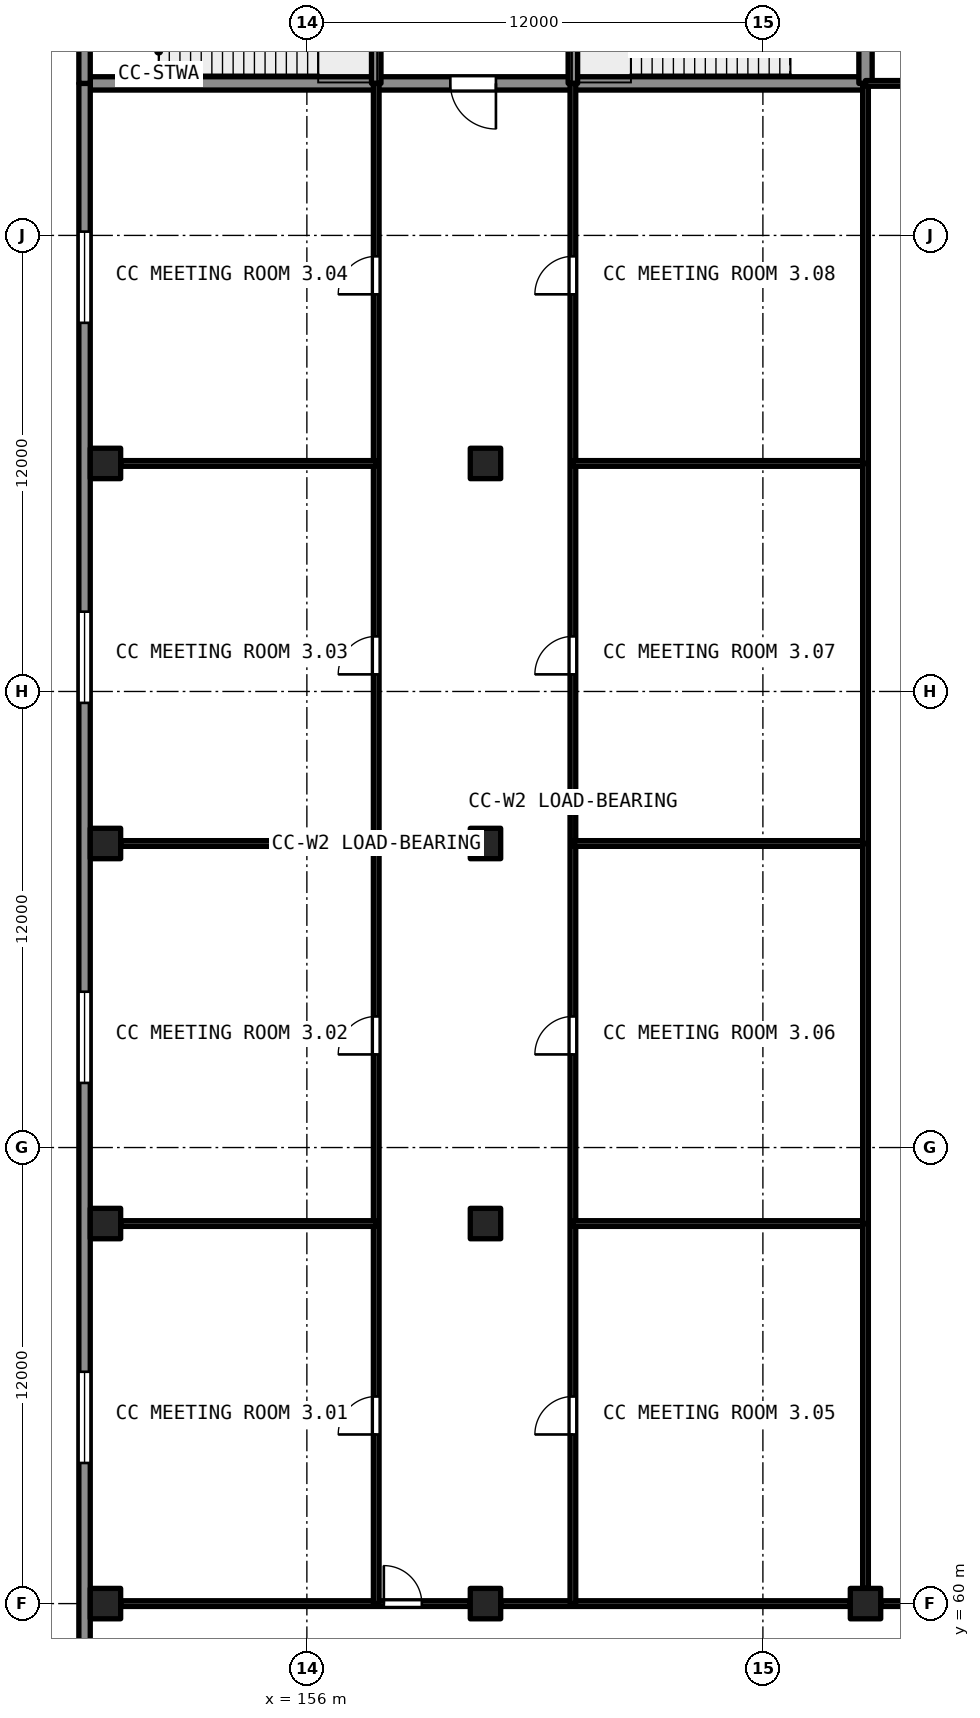
"""IFC4 building model, lengths in metres.
Left out: names, types, materials, properties, quantities, classifications, styles, units other than length and angle.
Written with IfcOpenShell. Run it as: python <this file> out.ifc"""

import sys

from ifc_helpers import new_model, si_unit, direction, frame, frame_2d, origin, origin_2d, place, context, subcontext, project, spatial, rectangle, extrude, element, fill, save


model = new_model("IFC4")
c1 = context("Model", 3, precision=1e-05, world=origin(), true_north=direction((0.0, 1.0)))
c2 = subcontext(c1, "Body", "Model", "MODEL_VIEW")
j1 = project(units=[si_unit("LENGTHUNIT", "METRE"), si_unit("PLANEANGLEUNIT", "RADIAN")], contexts=[c1])
p1 = place(None, origin())
s1 = spatial("IfcSite", under=j1, at=p1, CompositionType="ELEMENT")
p2 = place(p1, origin())
s2 = spatial("IfcBuilding", under=s1, at=p2, CompositionType="ELEMENT")
p3 = place(p2, frame((0.0, 0.0, 20.4)))
s3 = spatial("IfcBuildingStorey", under=s2, at=p3, CompositionType="ELEMENT", Elevation=20.4)
for number, where, z_axis, x_axis in (
    (1, (150.7, 60.0, 0.0), (0.0, 0.0, 1.0), (1.0, 0.0, 0.0)),
    (2, (150.7, 70.0, 0.0), (0.0, 0.0, 1.0), (1.0, 0.0, 0.0)),
    (3, (150.7, 80.0, 0.0), (0.0, 0.0, 1.0), (1.0, 0.0, 0.0)),
    (4, (150.7, 90.0, 0.0), (0.0, 0.0, 1.0), (1.0, 0.0, 0.0)),
    (5, (160.7, 60.0, 0.0), (0.0, 0.0, 1.0), (1.0, 0.0, 0.0)),
    (6, (160.7, 70.0, 0.0), (0.0, 0.0, 1.0), (1.0, 0.0, 0.0)),
    (7, (160.7, 80.0, 0.0), (0.0, 0.0, 1.0), (1.0, 0.0, 0.0)),
    (8, (160.7, 90.0, 0.0), (0.0, 0.0, 1.0), (1.0, 0.0, 0.0)),
    (9, (170.7, 60.0, 0.0), (0.0, 0.0, 1.0), (1.0, 0.0, 0.0)),
):
    element("IfcColumn", number, at=place(p3, frame(where, z_axis=z_axis, x_axis=x_axis)), inside=s3, PredefinedType="COLUMN", context=c2, shape_type="SweptSolid", body=[
        extrude(rectangle(XDim=0.8, YDim=0.8, at=origin_2d()), origin(), (0.0, 0.0, 1.0), 4.59),
    ])
p4 = place(p3, frame((150.3, 100.0, 0.0), z_axis=(0.0, 0.0, 1.0), x_axis=(1.0, 0.0, 0.0)))
e10 = element("IfcWall", 10, at=p4, inside=s3, PredefinedType="SHEAR", context=c2, shape_type="SweptSolid", body=[
    extrude(rectangle(XDim=7.525, YDim=0.35, at=frame_2d((3.762, 0.0))), origin(), (0.0, 0.0, 1.0), 4.59),
])
p5 = place(p3, frame((163.0, 100.0, 0.0), z_axis=(0.0, 0.0, 1.0), x_axis=(-1.0, 0.0, 0.0)))
e11 = element("IfcWall", 11, at=p5, inside=s3, PredefinedType="SHEAR", context=c2, shape_type="SweptSolid", body=[
    extrude(rectangle(XDim=5.175, YDim=0.35, at=frame_2d((2.587, 0.0))), origin(), (0.0, 0.0, 1.0), 4.59),
])
p6 = place(p5, frame((2.025, 0.0, 0.0)))
e12 = element("IfcOpeningElement", 12, at=p6, cuts=e11, PredefinedType="OPENING", context=c2, shape_type="SweptSolid", body=[
    extrude(rectangle(XDim=1.2, YDim=2.1, at=frame_2d((0.6, 1.05))), frame((0.0, 0.186, 0.0), z_axis=(0.0, -1.0, 0.0), x_axis=(1.0, 0.0, 0.0)), (0.0, 0.0, 1.0), 0.371),
])
p7 = place(p3, frame((163.0, 100.0, 0.0), z_axis=(0.0, 0.0, 1.0), x_axis=(1.0, 0.0, 0.0)))
e13 = element("IfcWall", 13, at=p7, inside=s3, PredefinedType="SHEAR", context=c2, shape_type="SweptSolid", body=[
    extrude(rectangle(XDim=7.7, YDim=0.35, at=frame_2d((3.85, 0.0))), origin(), (0.0, 0.0, 1.0), 4.59),
])
p8 = place(p3, frame((170.7, 100.0, 0.0), z_axis=(0.0, 0.0, 1.0), x_axis=(0.0, 1.0, 0.0)))
e14 = element("IfcWall", 14, at=p8, inside=s3, PredefinedType="SHEAR", context=c2, shape_type="SweptSolid", body=[
    extrude(rectangle(XDim=3.15, YDim=0.35, at=frame_2d((1.575, 0.0))), origin(), (0.0, 0.0, 1.0), 4.59),
])
for number, where, z_axis, x_axis in (
    (15, (157.825, 100.0, 0.0), (0.0, 0.0, 1.0), (0.0, 1.0, 0.0)),
    (16, (163.0, 100.0, 0.0), (0.0, 0.0, 1.0), (0.0, 1.0, 0.0)),
):
    element("IfcWall", number, at=place(p3, frame(where, z_axis=z_axis, x_axis=x_axis)), inside=s3, PredefinedType="SHEAR", context=c2, shape_type="SweptSolid", body=[
        extrude(rectangle(XDim=3.15, YDim=0.25, at=frame_2d((1.575, 0.0))), origin(), (0.0, 0.0, 1.0), 4.59),
    ])
p9 = place(p3, frame((150.15, 49.45, 0.0), z_axis=(0.0, 0.0, 1.0), x_axis=(0.0, 1.0, 0.0)))
e17 = element("IfcWall", 17, at=p9, inside=s3, PredefinedType="SOLIDWALL", context=c2, shape_type="SweptSolid", body=[
    extrude(rectangle(XDim=50.55, YDim=0.3, at=frame_2d((25.275, 0.0))), origin(), (0.0, 0.0, 1.0), 4.59),
])
p10 = place(p9, frame((14.25, 0.0, 0.9)))
e18 = element("IfcOpeningElement", 18, at=p10, cuts=e17, PredefinedType="OPENING", context=c2, shape_type="SweptSolid", body=[
    extrude(rectangle(XDim=2.4, YDim=1.8, at=frame_2d((1.2, 0.9))), frame((0.0, 0.161, 0.0), z_axis=(0.0, -1.0, 0.0), x_axis=(1.0, 0.0, 0.0)), (0.0, 0.0, 1.0), 0.321),
])
p11 = place(p9, frame((24.25, 0.0, 0.9)))
e19 = element("IfcOpeningElement", 19, at=p11, cuts=e17, PredefinedType="OPENING", context=c2, shape_type="SweptSolid", body=[
    extrude(rectangle(XDim=2.4, YDim=1.8, at=frame_2d((1.2, 0.9))), frame((0.0, 0.161, 0.0), z_axis=(0.0, -1.0, 0.0), x_axis=(1.0, 0.0, 0.0)), (0.0, 0.0, 1.0), 0.321),
])
p12 = place(p9, frame((34.25, 0.0, 0.9)))
e20 = element("IfcOpeningElement", 20, at=p12, cuts=e17, PredefinedType="OPENING", context=c2, shape_type="SweptSolid", body=[
    extrude(rectangle(XDim=2.4, YDim=1.8, at=frame_2d((1.2, 0.9))), frame((0.0, 0.161, 0.0), z_axis=(0.0, -1.0, 0.0), x_axis=(1.0, 0.0, 0.0)), (0.0, 0.0, 1.0), 0.321),
])
p13 = place(p9, frame((44.25, 0.0, 0.9)))
e21 = element("IfcOpeningElement", 21, at=p13, cuts=e17, PredefinedType="OPENING", context=c2, shape_type="SweptSolid", body=[
    extrude(rectangle(XDim=2.4, YDim=1.8, at=frame_2d((1.2, 0.9))), frame((0.0, 0.161, 0.0), z_axis=(0.0, -1.0, 0.0), x_axis=(1.0, 0.0, 0.0)), (0.0, 0.0, 1.0), 0.321),
])
p14 = place(p3, frame((150.15, 100.0, 0.0), z_axis=(0.0, 0.0, 1.0), x_axis=(0.0, 1.0, 0.0)))
e22 = element("IfcWall", 22, at=p14, inside=s3, PredefinedType="SOLIDWALL", context=c2, shape_type="SweptSolid", body=[
    extrude(rectangle(XDim=3.15, YDim=0.3, at=frame_2d((1.575, 0.0))), origin(), (0.0, 0.0, 1.0), 4.59),
])
p15 = place(p3, frame((160.3, 60.0, 0.0), z_axis=(0.0, 0.0, 1.0), x_axis=(-1.0, 0.0, 0.0)))
e23 = element("IfcWall", 23, at=p15, inside=s3, PredefinedType="PARTITIONING", context=c2, shape_type="SweptSolid", body=[
    extrude(rectangle(XDim=9.2, YDim=0.15, at=frame_2d((4.6, 0.0))), origin(), (0.0, 0.0, 1.0), 4.59),
])
p16 = place(p15, frame((1.275, 0.0, 0.0)))
e24 = element("IfcOpeningElement", 24, at=p16, cuts=e23, PredefinedType="OPENING", context=c2, shape_type="SweptSolid", body=[
    extrude(rectangle(XDim=1.0, YDim=2.1, at=frame_2d((0.5, 1.05))), frame((0.0, 0.085, 0.0), z_axis=(0.0, -1.0, 0.0), x_axis=(1.0, 0.0, 0.0)), (0.0, 0.0, 1.0), 0.171),
])
p17 = place(p3, frame((161.1, 60.0, 0.0), z_axis=(0.0, 0.0, 1.0), x_axis=(1.0, 0.0, 0.0)))
e25 = element("IfcWall", 25, at=p17, inside=s3, PredefinedType="PARTITIONING", context=c2, shape_type="SweptSolid", body=[
    extrude(rectangle(XDim=9.2, YDim=0.15, at=frame_2d((4.6, 0.0))), origin(), (0.0, 0.0, 1.0), 4.59),
])
p18 = place(p3, frame((180.3, 60.0, 0.0), z_axis=(0.0, 0.0, 1.0), x_axis=(-1.0, 0.0, 0.0)))
e26 = element("IfcWall", 26, at=p18, inside=s3, PredefinedType="PARTITIONING", context=c2, shape_type="SweptSolid", body=[
    extrude(rectangle(XDim=9.2, YDim=0.15, at=frame_2d((4.6, 0.0))), origin(), (0.0, 0.0, 1.0), 4.59),
])
p19 = place(p18, frame((3.6, 0.0, 0.0)))
e27 = element("IfcOpeningElement", 27, at=p19, cuts=e26, PredefinedType="OPENING", context=c2, shape_type="SweptSolid", body=[
    extrude(rectangle(XDim=1.8, YDim=2.1, at=frame_2d((0.9, 1.05))), frame((0.0, 0.085, 0.0), z_axis=(0.0, -1.0, 0.0), x_axis=(1.0, 0.0, 0.0)), (0.0, 0.0, 1.0), 0.171),
])
p20 = place(p3, frame((157.825, 100.0, 0.0), z_axis=(0.0, 0.0, 1.0), x_axis=(0.0, -1.0, 0.0)))
e28 = element("IfcWall", 28, at=p20, inside=s3, PredefinedType="PARTITIONING", context=c2, shape_type="SweptSolid", body=[
    extrude(rectangle(XDim=40.0, YDim=0.15, at=frame_2d((20.0, 0.0))), origin(), (0.0, 0.0, 1.0), 4.59),
])
p21 = place(p20, frame((34.55, 0.0, 0.0)))
e29 = element("IfcOpeningElement", 29, at=p21, cuts=e28, PredefinedType="OPENING", context=c2, shape_type="SweptSolid", body=[
    extrude(rectangle(XDim=1.0, YDim=2.1, at=frame_2d((0.5, 1.05))), frame((0.0, 0.085, 0.0), z_axis=(0.0, -1.0, 0.0), x_axis=(1.0, 0.0, 0.0)), (0.0, 0.0, 1.0), 0.171),
])
p22 = place(p20, frame((24.55, 0.0, 0.0)))
e30 = element("IfcOpeningElement", 30, at=p22, cuts=e28, PredefinedType="OPENING", context=c2, shape_type="SweptSolid", body=[
    extrude(rectangle(XDim=1.0, YDim=2.1, at=frame_2d((0.5, 1.05))), frame((0.0, 0.085, 0.0), z_axis=(0.0, -1.0, 0.0), x_axis=(1.0, 0.0, 0.0)), (0.0, 0.0, 1.0), 0.171),
])
p23 = place(p20, frame((14.55, 0.0, 0.0)))
e31 = element("IfcOpeningElement", 31, at=p23, cuts=e28, PredefinedType="OPENING", context=c2, shape_type="SweptSolid", body=[
    extrude(rectangle(XDim=1.0, YDim=2.1, at=frame_2d((0.5, 1.05))), frame((0.0, 0.085, 0.0), z_axis=(0.0, -1.0, 0.0), x_axis=(1.0, 0.0, 0.0)), (0.0, 0.0, 1.0), 0.171),
])
p24 = place(p20, frame((4.55, 0.0, 0.0)))
e32 = element("IfcOpeningElement", 32, at=p24, cuts=e28, PredefinedType="OPENING", context=c2, shape_type="SweptSolid", body=[
    extrude(rectangle(XDim=1.0, YDim=2.1, at=frame_2d((0.5, 1.05))), frame((0.0, 0.085, 0.0), z_axis=(0.0, -1.0, 0.0), x_axis=(1.0, 0.0, 0.0)), (0.0, 0.0, 1.0), 0.171),
])
p25 = place(p3, frame((163.0, 60.0, 0.0), z_axis=(0.0, 0.0, 1.0), x_axis=(0.0, 1.0, 0.0)))
e33 = element("IfcWall", 33, at=p25, inside=s3, PredefinedType="PARTITIONING", context=c2, shape_type="SweptSolid", body=[
    extrude(rectangle(XDim=40.0, YDim=0.15, at=frame_2d((20.0, 0.0))), origin(), (0.0, 0.0, 1.0), 4.59),
])
p26 = place(p25, frame((4.45, 0.0, 0.0)))
e34 = element("IfcOpeningElement", 34, at=p26, cuts=e33, PredefinedType="OPENING", context=c2, shape_type="SweptSolid", body=[
    extrude(rectangle(XDim=1.0, YDim=2.1, at=frame_2d((0.5, 1.05))), frame((0.0, 0.085, 0.0), z_axis=(0.0, -1.0, 0.0), x_axis=(1.0, 0.0, 0.0)), (0.0, 0.0, 1.0), 0.171),
])
p27 = place(p25, frame((14.45, 0.0, 0.0)))
e35 = element("IfcOpeningElement", 35, at=p27, cuts=e33, PredefinedType="OPENING", context=c2, shape_type="SweptSolid", body=[
    extrude(rectangle(XDim=1.0, YDim=2.1, at=frame_2d((0.5, 1.05))), frame((0.0, 0.085, 0.0), z_axis=(0.0, -1.0, 0.0), x_axis=(1.0, 0.0, 0.0)), (0.0, 0.0, 1.0), 0.171),
])
p28 = place(p25, frame((24.45, 0.0, 0.0)))
e36 = element("IfcOpeningElement", 36, at=p28, cuts=e33, PredefinedType="OPENING", context=c2, shape_type="SweptSolid", body=[
    extrude(rectangle(XDim=1.0, YDim=2.1, at=frame_2d((0.5, 1.05))), frame((0.0, 0.085, 0.0), z_axis=(0.0, -1.0, 0.0), x_axis=(1.0, 0.0, 0.0)), (0.0, 0.0, 1.0), 0.171),
])
p29 = place(p25, frame((34.45, 0.0, 0.0)))
e37 = element("IfcOpeningElement", 37, at=p29, cuts=e33, PredefinedType="OPENING", context=c2, shape_type="SweptSolid", body=[
    extrude(rectangle(XDim=1.0, YDim=2.1, at=frame_2d((0.5, 1.05))), frame((0.0, 0.085, 0.0), z_axis=(0.0, -1.0, 0.0), x_axis=(1.0, 0.0, 0.0)), (0.0, 0.0, 1.0), 0.171),
])
p30 = place(p3, frame((151.1, 70.0, 0.0), z_axis=(0.0, 0.0, 1.0), x_axis=(1.0, 0.0, 0.0)))
e38 = element("IfcWall", 38, at=p30, inside=s3, PredefinedType="PARTITIONING", context=c2, shape_type="SweptSolid", body=[
    extrude(rectangle(XDim=6.725, YDim=0.15, at=frame_2d((3.362, 0.0))), origin(), (0.0, 0.0, 1.0), 4.59),
])
p31 = place(p3, frame((163.0, 70.0, 0.0), z_axis=(0.0, 0.0, 1.0), x_axis=(1.0, 0.0, 0.0)))
e39 = element("IfcWall", 39, at=p31, inside=s3, PredefinedType="PARTITIONING", context=c2, shape_type="SweptSolid", body=[
    extrude(rectangle(XDim=7.7, YDim=0.15, at=frame_2d((3.85, 0.0))), origin(), (0.0, 0.0, 1.0), 4.59),
])
p32 = place(p3, frame((170.7, 60.4, 0.0), z_axis=(0.0, 0.0, 1.0), x_axis=(0.0, 1.0, 0.0)))
e40 = element("IfcWall", 40, at=p32, inside=s3, PredefinedType="PARTITIONING", context=c2, shape_type="SweptSolid", body=[
    extrude(rectangle(XDim=9.6, YDim=0.15, at=frame_2d((4.8, 0.0))), origin(), (0.0, 0.0, 1.0), 4.59),
])
p33 = place(p3, frame((151.1, 80.0, 0.0), z_axis=(0.0, 0.0, 1.0), x_axis=(1.0, 0.0, 0.0)))
e41 = element("IfcWall", 41, at=p33, inside=s3, PredefinedType="PARTITIONING", context=c2, shape_type="SweptSolid", body=[
    extrude(rectangle(XDim=6.725, YDim=0.15, at=frame_2d((3.362, 0.0))), origin(), (0.0, 0.0, 1.0), 4.59),
])
p34 = place(p3, frame((163.0, 80.0, 0.0), z_axis=(0.0, 0.0, 1.0), x_axis=(1.0, 0.0, 0.0)))
e42 = element("IfcWall", 42, at=p34, inside=s3, PredefinedType="PARTITIONING", context=c2, shape_type="SweptSolid", body=[
    extrude(rectangle(XDim=7.7, YDim=0.15, at=frame_2d((3.85, 0.0))), origin(), (0.0, 0.0, 1.0), 4.59),
])
p35 = place(p3, frame((170.7, 70.0, 0.0), z_axis=(0.0, 0.0, 1.0), x_axis=(0.0, 1.0, 0.0)))
e43 = element("IfcWall", 43, at=p35, inside=s3, PredefinedType="PARTITIONING", context=c2, shape_type="SweptSolid", body=[
    extrude(rectangle(XDim=10.0, YDim=0.15, at=frame_2d((5.0, 0.0))), origin(), (0.0, 0.0, 1.0), 4.59),
])
p36 = place(p3, frame((151.1, 90.0, 0.0), z_axis=(0.0, 0.0, 1.0), x_axis=(1.0, 0.0, 0.0)))
e44 = element("IfcWall", 44, at=p36, inside=s3, PredefinedType="PARTITIONING", context=c2, shape_type="SweptSolid", body=[
    extrude(rectangle(XDim=6.725, YDim=0.15, at=frame_2d((3.362, 0.0))), origin(), (0.0, 0.0, 1.0), 4.59),
])
p37 = place(p3, frame((163.0, 90.0, 0.0), z_axis=(0.0, 0.0, 1.0), x_axis=(1.0, 0.0, 0.0)))
e45 = element("IfcWall", 45, at=p37, inside=s3, PredefinedType="PARTITIONING", context=c2, shape_type="SweptSolid", body=[
    extrude(rectangle(XDim=7.7, YDim=0.15, at=frame_2d((3.85, 0.0))), origin(), (0.0, 0.0, 1.0), 4.59),
])
for number, where, z_axis, x_axis in (
    (46, (170.7, 80.0, 0.0), (0.0, 0.0, 1.0), (0.0, 1.0, 0.0)),
    (47, (170.7, 90.0, 0.0), (0.0, 0.0, 1.0), (0.0, 1.0, 0.0)),
):
    element("IfcWall", number, at=place(p3, frame(where, z_axis=z_axis, x_axis=x_axis)), inside=s3, PredefinedType="PARTITIONING", context=c2, shape_type="SweptSolid", body=[
        extrude(rectangle(XDim=10.0, YDim=0.15, at=frame_2d((5.0, 0.0))), origin(), (0.0, 0.0, 1.0), 4.59),
    ])
p38 = place(p3, frame((170.7, 100.0, 0.0), z_axis=(0.0, 0.0, 1.0), x_axis=(1.0, 0.0, 0.0)))
e48 = element("IfcWall", 48, at=p38, inside=s3, PredefinedType="PARTITIONING", context=c2, shape_type="SweptSolid", body=[
    extrude(rectangle(XDim=9.6, YDim=0.15, at=frame_2d((4.8, 0.0))), origin(), (0.0, 0.0, 1.0), 4.59),
])
p39 = place(p16, origin())
e49 = element("IfcDoor", 49, at=p39, inside=s3, OperationType="SINGLE_SWING_RIGHT", PredefinedType="DOOR", context=c2, shape_type="SweptSolid", body=[
    extrude(rectangle(XDim=1.0, YDim=2.1, at=frame_2d((0.5, 1.05))), frame((0.0, 0.025, 0.0), z_axis=(0.0, -1.0, 0.0), x_axis=(1.0, 0.0, 0.0)), (0.0, 0.0, 1.0), 0.05),
])
fill(e24, e49)
p40 = place(p6, origin())
e50 = element("IfcDoor", 50, at=p40, inside=s3, OperationType="SINGLE_SWING_LEFT", PredefinedType="DOOR", context=c2, shape_type="SweptSolid", body=[
    extrude(rectangle(XDim=1.2, YDim=2.1, at=frame_2d((0.6, 1.05))), frame((0.0, 0.025, 0.0), z_axis=(0.0, -1.0, 0.0), x_axis=(1.0, 0.0, 0.0)), (0.0, 0.0, 1.0), 0.05),
])
fill(e12, e50)
p41 = place(p21, origin())
e51 = element("IfcDoor", 51, at=p41, inside=s3, OperationType="SINGLE_SWING_RIGHT", PredefinedType="DOOR", context=c2, shape_type="SweptSolid", body=[
    extrude(rectangle(XDim=1.0, YDim=2.1, at=frame_2d((0.5, 1.05))), frame((0.0, 0.025, 0.0), z_axis=(0.0, -1.0, 0.0), x_axis=(1.0, 0.0, 0.0)), (0.0, 0.0, 1.0), 0.05),
])
fill(e29, e51)
p42 = place(p26, origin())
e52 = element("IfcDoor", 52, at=p42, inside=s3, OperationType="SINGLE_SWING_LEFT", PredefinedType="DOOR", context=c2, shape_type="SweptSolid", body=[
    extrude(rectangle(XDim=1.0, YDim=2.1, at=frame_2d((0.5, 1.05))), frame((0.0, 0.025, 0.0), z_axis=(0.0, -1.0, 0.0), x_axis=(1.0, 0.0, 0.0)), (0.0, 0.0, 1.0), 0.05),
])
fill(e34, e52)
p43 = place(p22, origin())
e53 = element("IfcDoor", 53, at=p43, inside=s3, OperationType="SINGLE_SWING_RIGHT", PredefinedType="DOOR", context=c2, shape_type="SweptSolid", body=[
    extrude(rectangle(XDim=1.0, YDim=2.1, at=frame_2d((0.5, 1.05))), frame((0.0, 0.025, 0.0), z_axis=(0.0, -1.0, 0.0), x_axis=(1.0, 0.0, 0.0)), (0.0, 0.0, 1.0), 0.05),
])
fill(e30, e53)
p44 = place(p27, origin())
e54 = element("IfcDoor", 54, at=p44, inside=s3, OperationType="SINGLE_SWING_LEFT", PredefinedType="DOOR", context=c2, shape_type="SweptSolid", body=[
    extrude(rectangle(XDim=1.0, YDim=2.1, at=frame_2d((0.5, 1.05))), frame((0.0, 0.025, 0.0), z_axis=(0.0, -1.0, 0.0), x_axis=(1.0, 0.0, 0.0)), (0.0, 0.0, 1.0), 0.05),
])
fill(e35, e54)
p45 = place(p23, origin())
e55 = element("IfcDoor", 55, at=p45, inside=s3, OperationType="SINGLE_SWING_RIGHT", PredefinedType="DOOR", context=c2, shape_type="SweptSolid", body=[
    extrude(rectangle(XDim=1.0, YDim=2.1, at=frame_2d((0.5, 1.05))), frame((0.0, 0.025, 0.0), z_axis=(0.0, -1.0, 0.0), x_axis=(1.0, 0.0, 0.0)), (0.0, 0.0, 1.0), 0.05),
])
fill(e31, e55)
p46 = place(p28, origin())
e56 = element("IfcDoor", 56, at=p46, inside=s3, OperationType="SINGLE_SWING_LEFT", PredefinedType="DOOR", context=c2, shape_type="SweptSolid", body=[
    extrude(rectangle(XDim=1.0, YDim=2.1, at=frame_2d((0.5, 1.05))), frame((0.0, 0.025, 0.0), z_axis=(0.0, -1.0, 0.0), x_axis=(1.0, 0.0, 0.0)), (0.0, 0.0, 1.0), 0.05),
])
fill(e36, e56)
p47 = place(p24, origin())
e57 = element("IfcDoor", 57, at=p47, inside=s3, OperationType="SINGLE_SWING_RIGHT", PredefinedType="DOOR", context=c2, shape_type="SweptSolid", body=[
    extrude(rectangle(XDim=1.0, YDim=2.1, at=frame_2d((0.5, 1.05))), frame((0.0, 0.025, 0.0), z_axis=(0.0, -1.0, 0.0), x_axis=(1.0, 0.0, 0.0)), (0.0, 0.0, 1.0), 0.05),
])
fill(e32, e57)
p48 = place(p29, origin())
e58 = element("IfcDoor", 58, at=p48, inside=s3, OperationType="SINGLE_SWING_LEFT", PredefinedType="DOOR", context=c2, shape_type="SweptSolid", body=[
    extrude(rectangle(XDim=1.0, YDim=2.1, at=frame_2d((0.5, 1.05))), frame((0.0, 0.025, 0.0), z_axis=(0.0, -1.0, 0.0), x_axis=(1.0, 0.0, 0.0)), (0.0, 0.0, 1.0), 0.05),
])
fill(e37, e58)
p49 = place(p10, origin())
e59 = element("IfcWindow", 59, at=p49, inside=s3, PartitioningType="DOUBLE_PANEL_VERTICAL", PredefinedType="WINDOW", context=c2, shape_type="SweptSolid", body=[
    extrude(rectangle(XDim=2.4, YDim=1.8, at=frame_2d((1.2, 0.9))), frame((0.0, 0.03, 0.0), z_axis=(0.0, -1.0, 0.0), x_axis=(1.0, 0.0, 0.0)), (0.0, 0.0, 1.0), 0.06),
])
fill(e18, e59)
p50 = place(p11, origin())
e60 = element("IfcWindow", 60, at=p50, inside=s3, PartitioningType="DOUBLE_PANEL_VERTICAL", PredefinedType="WINDOW", context=c2, shape_type="SweptSolid", body=[
    extrude(rectangle(XDim=2.4, YDim=1.8, at=frame_2d((1.2, 0.9))), frame((0.0, 0.03, 0.0), z_axis=(0.0, -1.0, 0.0), x_axis=(1.0, 0.0, 0.0)), (0.0, 0.0, 1.0), 0.06),
])
fill(e19, e60)
p51 = place(p12, origin())
e61 = element("IfcWindow", 61, at=p51, inside=s3, PartitioningType="DOUBLE_PANEL_VERTICAL", PredefinedType="WINDOW", context=c2, shape_type="SweptSolid", body=[
    extrude(rectangle(XDim=2.4, YDim=1.8, at=frame_2d((1.2, 0.9))), frame((0.0, 0.03, 0.0), z_axis=(0.0, -1.0, 0.0), x_axis=(1.0, 0.0, 0.0)), (0.0, 0.0, 1.0), 0.06),
])
fill(e20, e61)
p52 = place(p13, origin())
e62 = element("IfcWindow", 62, at=p52, inside=s3, PartitioningType="DOUBLE_PANEL_VERTICAL", PredefinedType="WINDOW", context=c2, shape_type="SweptSolid", body=[
    extrude(rectangle(XDim=2.4, YDim=1.8, at=frame_2d((1.2, 0.9))), frame((0.0, 0.03, 0.0), z_axis=(0.0, -1.0, 0.0), x_axis=(1.0, 0.0, 0.0)), (0.0, 0.0, 1.0), 0.06),
])
fill(e21, e62)
save(model, sys.argv[1])
